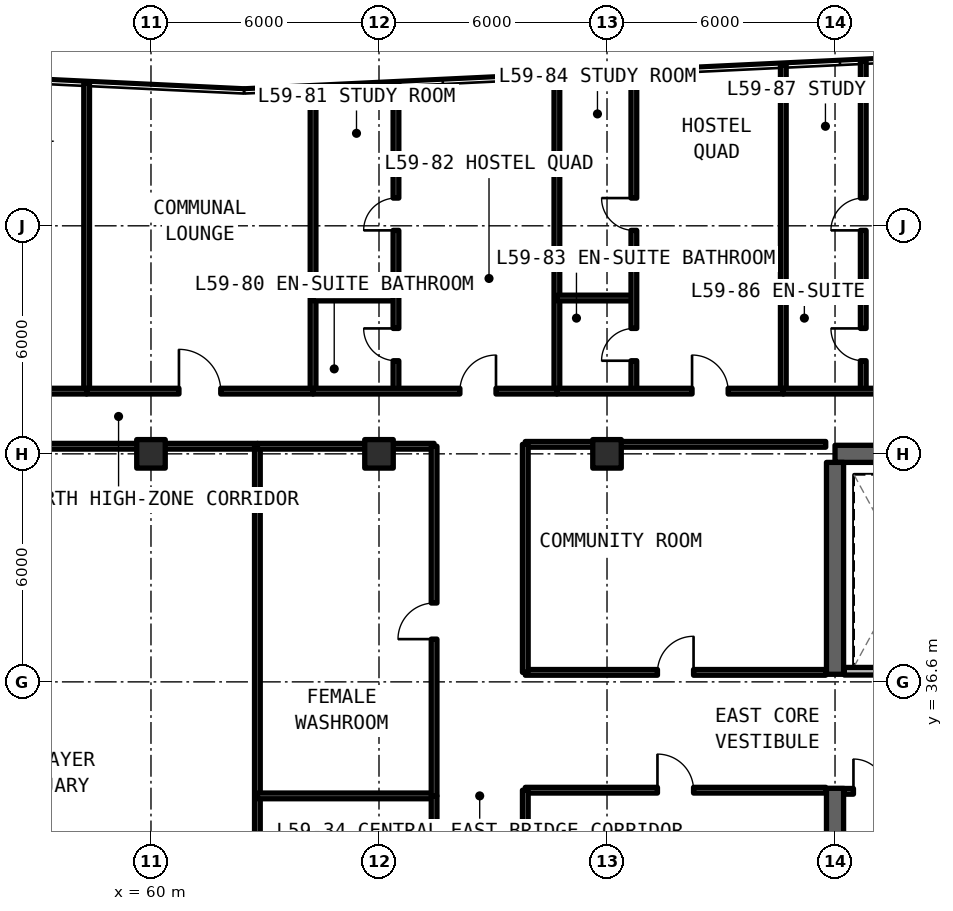
"""IFC4 building model, lengths in metres.
Left out: names, types, materials, properties, quantities, classifications, styles, units other than length and angle.
Written with IfcOpenShell. Run it as: python <this file> out.ifc"""

import sys

from ifc_helpers import new_model, si_unit, direction, frame, frame_2d, origin, origin_2d, place, context, subcontext, project, spatial, rectangle, extrude, element, fill, save


model = new_model("IFC4")
c1 = context("Model", 3, precision=1e-05, world=origin(), true_north=direction((0.0, 1.0)))
c2 = subcontext(c1, "Body", "Model", "MODEL_VIEW")
j1 = project(units=[si_unit("LENGTHUNIT", "METRE"), si_unit("PLANEANGLEUNIT", "RADIAN")], contexts=[c1])
p1 = place(None, origin())
s1 = spatial("IfcSite", under=j1, at=p1, CompositionType="ELEMENT")
p2 = place(p1, origin())
s2 = spatial("IfcBuilding", under=s1, at=p2, CompositionType="ELEMENT")
p3 = place(p2, frame((0.0, 0.0, 211.86)))
s3 = spatial("IfcBuildingStorey", under=s2, at=p3, CompositionType="ELEMENT", Elevation=211.86)
p4 = place(p3, frame((90.0, 42.6, 0.0), z_axis=(0.0, 0.0, 1.0), x_axis=(-1.0, 0.0, 0.0)))
e1 = element("IfcWall", 1, at=p4, inside=s3, PredefinedType="SHEAR", context=c2, shape_type="SweptSolid", body=[
    extrude(rectangle(XDim=12.0, YDim=0.45, at=frame_2d((6.0, 0.0))), origin(), (0.0, 0.0, 1.0), 3.63),
])
p5 = place(p3, frame((78.0, 24.825, 0.0), z_axis=(0.0, 0.0, 1.0), x_axis=(0.0, 1.0, 0.0)))
e2 = element("IfcWall", 2, at=p5, inside=s3, PredefinedType="SHEAR", context=c2, shape_type="SweptSolid", body=[
    extrude(rectangle(XDim=8.975, YDim=0.45, at=frame_2d((4.488, 0.0))), origin(), (0.0, 0.0, 1.0), 3.63),
])
p6 = place(p3, frame((78.0, 36.8, 0.0), z_axis=(0.0, 0.0, 1.0), x_axis=(0.0, 1.0, 0.0)))
e3 = element("IfcWall", 3, at=p6, inside=s3, PredefinedType="SHEAR", context=c2, shape_type="SweptSolid", body=[
    extrude(rectangle(XDim=5.575, YDim=0.45, at=frame_2d((2.788, 0.0))), origin(), (0.0, 0.0, 1.0), 3.63),
])
for number, where, z_axis, x_axis in (
    (4, (60.0, 42.6, 0.0), (0.0, 0.0, 1.0), (1.0, 0.0, 0.0)),
    (5, (66.0, 42.6, 0.0), (0.0, 0.0, 1.0), (1.0, 0.0, 0.0)),
    (6, (72.0, 42.6, 0.0), (0.0, 0.0, 1.0), (1.0, 0.0, 0.0)),
):
    element("IfcColumn", number, at=place(p3, frame(where, z_axis=z_axis, x_axis=x_axis)), inside=s3, PredefinedType="COLUMN", context=c2, shape_type="SweptSolid", body=[
        extrude(rectangle(XDim=0.75, YDim=0.75, at=origin_2d()), origin(), (0.0, 0.0, 1.0), 3.63),
    ])
p7 = place(p3, frame((78.245, 33.72, 0.0), z_axis=(0.0, 0.0, 1.0), x_axis=(1.0, 0.0, 0.0)))
e7 = element("IfcWall", 7, at=p7, inside=s3, PredefinedType="SOLIDWALL", context=c2, shape_type="SweptSolid", body=[
    extrude(rectangle(XDim=1.395, YDim=0.15, at=frame_2d((0.697, 0.0))), origin(), (0.0, 0.0, 1.0), 2.63),
])
p8 = place(p7, frame((0.24, 0.0, 0.0)))
e8 = element("IfcOpeningElement", 8, at=p8, cuts=e7, PredefinedType="OPENING", context=c2, shape_type="SweptSolid", body=[
    extrude(rectangle(XDim=0.85, YDim=2.1, at=frame_2d((0.425, 1.05))), frame((0.0, 0.085, 0.0), z_axis=(0.0, -1.0, 0.0), x_axis=(1.0, 0.0, 0.0)), (0.0, 0.0, 1.0), 0.17),
])
p9 = place(p3, frame((78.245, 36.88, 0.0), z_axis=(0.0, 0.0, 1.0), x_axis=(1.0, 0.0, 0.0)))
e9 = element("IfcWall", 9, at=p9, inside=s3, PredefinedType="SOLIDWALL", context=c2, shape_type="SweptSolid", body=[
    extrude(rectangle(XDim=3.075, YDim=0.2, at=frame_2d((1.538, 0.0))), origin(), (0.0, 0.0, 1.0), 2.63),
])
p10 = place(p3, frame((69.85, 33.75, 0.0), z_axis=(0.0, 0.0, 1.0), x_axis=(1.0, 0.0, 0.0)))
e10 = element("IfcWall", 10, at=p10, inside=s3, PredefinedType="SOLIDWALL", context=c2, shape_type="SweptSolid", body=[
    extrude(rectangle(XDim=7.905, YDim=0.15, at=frame_2d((3.952, 0.0))), origin(), (0.0, 0.0, 1.0), 2.63),
])
p11 = place(p10, frame((3.478, 0.0, 0.0)))
e11 = element("IfcOpeningElement", 11, at=p11, cuts=e10, PredefinedType="OPENING", context=c2, shape_type="SweptSolid", body=[
    extrude(rectangle(XDim=0.95, YDim=2.15, at=frame_2d((0.475, 1.075))), frame((0.0, 0.085, 0.0), z_axis=(0.0, -1.0, 0.0), x_axis=(1.0, 0.0, 0.0)), (0.0, 0.0, 1.0), 0.17),
])
p12 = place(p3, frame((69.85, 24.35, 0.0), z_axis=(0.0, 0.0, 1.0), x_axis=(0.0, 1.0, 0.0)))
e12 = element("IfcWall", 12, at=p12, inside=s3, PredefinedType="SOLIDWALL", context=c2, shape_type="SweptSolid", body=[
    extrude(rectangle(XDim=9.4, YDim=0.15, at=frame_2d((4.7, 0.0))), origin(), (0.0, 0.0, 1.0), 2.63),
])
p13 = place(p3, frame((69.85, 36.85, 0.0), z_axis=(0.0, 0.0, 1.0), x_axis=(1.0, 0.0, 0.0)))
e13 = element("IfcWall", 13, at=p13, inside=s3, PredefinedType="SOLIDWALL", context=c2, shape_type="SweptSolid", body=[
    extrude(rectangle(XDim=7.905, YDim=0.15, at=frame_2d((3.952, 0.0))), origin(), (0.0, 0.0, 1.0), 2.63),
])
p14 = place(p13, frame((3.478, 0.0, 0.0)))
e14 = element("IfcOpeningElement", 14, at=p14, cuts=e13, PredefinedType="OPENING", context=c2, shape_type="SweptSolid", body=[
    extrude(rectangle(XDim=0.95, YDim=2.15, at=frame_2d((0.475, 1.075))), frame((0.0, 0.085, 0.0), z_axis=(0.0, -1.0, 0.0), x_axis=(1.0, 0.0, 0.0)), (0.0, 0.0, 1.0), 0.17),
])
p15 = place(p3, frame((69.85, 42.85, 0.0), z_axis=(0.0, 0.0, 1.0), x_axis=(1.0, 0.0, 0.0)))
e15 = element("IfcWall", 15, at=p15, inside=s3, PredefinedType="SOLIDWALL", context=c2, shape_type="SweptSolid", body=[
    extrude(rectangle(XDim=7.905, YDim=0.15, at=frame_2d((3.952, 0.0))), origin(), (0.0, 0.0, 1.0), 2.63),
])
p16 = place(p3, frame((69.85, 36.85, 0.0), z_axis=(0.0, 0.0, 1.0), x_axis=(0.0, 1.0, 0.0)))
e16 = element("IfcWall", 16, at=p16, inside=s3, PredefinedType="SOLIDWALL", context=c2, shape_type="SweptSolid", body=[
    extrude(rectangle(XDim=6.0, YDim=0.15, at=frame_2d((3.0, 0.0))), origin(), (0.0, 0.0, 1.0), 2.63),
])
p17 = place(p3, frame((51.2, 42.8, 0.0), z_axis=(0.0, 0.0, 1.0), x_axis=(1.0, 0.0, 0.0)))
e17 = element("IfcWall", 17, at=p17, inside=s3, PredefinedType="SOLIDWALL", context=c2, shape_type="SweptSolid", body=[
    extrude(rectangle(XDim=11.6, YDim=0.15, at=frame_2d((5.8, 0.0))), origin(), (0.0, 0.0, 1.0), 2.63),
])
p18 = place(p3, frame((62.8, 24.4, 0.0), z_axis=(0.0, 0.0, 1.0), x_axis=(0.0, 1.0, 0.0)))
e18 = element("IfcWall", 18, at=p18, inside=s3, PredefinedType="SOLIDWALL", context=c2, shape_type="SweptSolid", body=[
    extrude(rectangle(XDim=18.4, YDim=0.15, at=frame_2d((9.2, 0.0))), origin(), (0.0, 0.0, 1.0), 2.63),
])
p19 = place(p3, frame((62.8, 33.6, 0.0), z_axis=(0.0, 0.0, 1.0), x_axis=(1.0, 0.0, 0.0)))
e19 = element("IfcWall", 19, at=p19, inside=s3, PredefinedType="SOLIDWALL", context=c2, shape_type="SweptSolid", body=[
    extrude(rectangle(XDim=4.65, YDim=0.15, at=frame_2d((2.325, 0.0))), origin(), (0.0, 0.0, 1.0), 2.63),
])
p20 = place(p3, frame((67.45, 24.4, 0.0), z_axis=(0.0, 0.0, 1.0), x_axis=(0.0, 1.0, 0.0)))
e20 = element("IfcWall", 20, at=p20, inside=s3, PredefinedType="SOLIDWALL", context=c2, shape_type="SweptSolid", body=[
    extrude(rectangle(XDim=9.2, YDim=0.15, at=frame_2d((4.6, 0.0))), origin(), (0.0, 0.0, 1.0), 2.63),
])
p21 = place(p20, frame((4.125, 0.0, 0.0)))
e21 = element("IfcOpeningElement", 21, at=p21, cuts=e20, PredefinedType="OPENING", context=c2, shape_type="SweptSolid", body=[
    extrude(rectangle(XDim=0.95, YDim=2.15, at=frame_2d((0.475, 1.075))), frame((0.0, 0.085, 0.0), z_axis=(0.0, -1.0, 0.0), x_axis=(1.0, 0.0, 0.0)), (0.0, 0.0, 1.0), 0.17),
])
p22 = place(p3, frame((62.8, 42.8, 0.0), z_axis=(0.0, 0.0, 1.0), x_axis=(1.0, 0.0, 0.0)))
e22 = element("IfcWall", 22, at=p22, inside=s3, PredefinedType="SOLIDWALL", context=c2, shape_type="SweptSolid", body=[
    extrude(rectangle(XDim=4.65, YDim=0.15, at=frame_2d((2.325, 0.0))), origin(), (0.0, 0.0, 1.0), 2.63),
])
p23 = place(p3, frame((67.45, 33.6, 0.0), z_axis=(0.0, 0.0, 1.0), x_axis=(0.0, 1.0, 0.0)))
e23 = element("IfcWall", 23, at=p23, inside=s3, PredefinedType="SOLIDWALL", context=c2, shape_type="SweptSolid", body=[
    extrude(rectangle(XDim=9.2, YDim=0.15, at=frame_2d((4.6, 0.0))), origin(), (0.0, 0.0, 1.0), 2.63),
])
p24 = place(p23, frame((4.125, 0.0, 0.0)))
e24 = element("IfcOpeningElement", 24, at=p24, cuts=e23, PredefinedType="OPENING", context=c2, shape_type="SweptSolid", body=[
    extrude(rectangle(XDim=0.95, YDim=2.15, at=frame_2d((0.475, 1.075))), frame((0.0, 0.085, 0.0), z_axis=(0.0, -1.0, 0.0), x_axis=(1.0, 0.0, 0.0)), (0.0, 0.0, 1.0), 0.17),
])
p25 = place(p3, frame((58.307, 44.25, 0.0), z_axis=(0.0, 0.0, 1.0), x_axis=(0.0, 1.0, 0.0)))
e25 = element("IfcWall", 25, at=p25, inside=s3, PredefinedType="SOLIDWALL", context=c2, shape_type="SweptSolid", body=[
    extrude(rectangle(XDim=8.108, YDim=0.15, at=frame_2d((4.054, 0.0))), origin(), (0.0, 0.0, 1.0), 2.63),
])
p26 = place(p3, frame((52.12, 44.25, 0.0), z_axis=(0.0, 0.0, 1.0), x_axis=(1.0, 0.0, 0.0)))
e26 = element("IfcWall", 26, at=p26, inside=s3, PredefinedType="SOLIDWALL", context=c2, shape_type="SweptSolid", body=[
    extrude(rectangle(XDim=6.187, YDim=0.15, at=frame_2d((3.093, 0.0))), origin(), (0.0, 0.0, 1.0), 2.63),
])
p27 = place(p26, frame((3.71, 0.0, 0.0)))
e27 = element("IfcOpeningElement", 27, at=p27, cuts=e26, PredefinedType="OPENING", context=c2, shape_type="SweptSolid", body=[
    extrude(rectangle(XDim=0.95, YDim=2.15, at=frame_2d((0.475, 1.075))), frame((0.0, 0.085, 0.0), z_axis=(0.0, -1.0, 0.0), x_axis=(1.0, 0.0, 0.0)), (0.0, 0.0, 1.0), 0.17),
])
p28 = place(p3, frame((64.265, 44.25, 0.0), z_axis=(0.0, 0.0, 1.0), x_axis=(0.0, 1.0, 0.0)))
e28 = element("IfcWall", 28, at=p28, inside=s3, PredefinedType="SOLIDWALL", context=c2, shape_type="SweptSolid", body=[
    extrude(rectangle(XDim=7.997, YDim=0.15, at=frame_2d((3.998, 0.0))), origin(), (0.0, 0.0, 1.0), 2.63),
])
p29 = place(p3, frame((58.307, 44.25, 0.0), z_axis=(0.0, 0.0, 1.0), x_axis=(1.0, 0.0, 0.0)))
e29 = element("IfcWall", 29, at=p29, inside=s3, PredefinedType="SOLIDWALL", context=c2, shape_type="SweptSolid", body=[
    extrude(rectangle(XDim=5.958, YDim=0.15, at=frame_2d((2.979, 0.0))), origin(), (0.0, 0.0, 1.0), 2.63),
])
p30 = place(p29, frame((2.429, 0.0, 0.0)))
e30 = element("IfcOpeningElement", 30, at=p30, cuts=e29, PredefinedType="OPENING", context=c2, shape_type="SweptSolid", body=[
    extrude(rectangle(XDim=1.1, YDim=2.15, at=frame_2d((0.55, 1.075))), frame((0.0, 0.085, 0.0), z_axis=(0.0, -1.0, 0.0), x_axis=(1.0, 0.0, 0.0)), (0.0, 0.0, 1.0), 0.17),
])
p31 = place(p3, frame((70.681, 44.25, 0.0), z_axis=(0.0, 0.0, 1.0), x_axis=(0.0, 1.0, 0.0)))
e31 = element("IfcWall", 31, at=p31, inside=s3, PredefinedType="SOLIDWALL", context=c2, shape_type="SweptSolid", body=[
    extrude(rectangle(XDim=8.304, YDim=0.15, at=frame_2d((4.152, 0.0))), origin(), (0.0, 0.0, 1.0), 2.63),
])
p32 = place(p3, frame((64.265, 46.7, 0.0), z_axis=(0.0, 0.0, 1.0), x_axis=(1.0, 0.0, 0.0)))
e32 = element("IfcWall", 32, at=p32, inside=s3, PredefinedType="PARTITIONING", context=c2, shape_type="SweptSolid", body=[
    extrude(rectangle(XDim=2.181, YDim=0.15, at=frame_2d((1.091, 0.0))), origin(), (0.0, 0.0, 1.0), 2.63),
])
p33 = place(p3, frame((66.446, 44.25, 0.0), z_axis=(0.0, 0.0, 1.0), x_axis=(0.0, 1.0, 0.0)))
e33 = element("IfcWall", 33, at=p33, inside=s3, PredefinedType="PARTITIONING", context=c2, shape_type="SweptSolid", body=[
    extrude(rectangle(XDim=8.101, YDim=0.15, at=frame_2d((4.051, 0.0))), origin(), (0.0, 0.0, 1.0), 2.63),
])
p34 = place(p33, frame((0.8, 0.0, 0.0)))
e34 = element("IfcOpeningElement", 34, at=p34, cuts=e33, PredefinedType="OPENING", context=c2, shape_type="SweptSolid", body=[
    extrude(rectangle(XDim=0.85, YDim=2.1, at=frame_2d((0.425, 1.05))), frame((0.0, 0.085, 0.0), z_axis=(0.0, -1.0, 0.0), x_axis=(1.0, 0.0, 0.0)), (0.0, 0.0, 1.0), 0.17),
])
p35 = place(p33, frame((4.23, 0.0, 0.0)))
e35 = element("IfcOpeningElement", 35, at=p35, cuts=e33, PredefinedType="OPENING", context=c2, shape_type="SweptSolid", body=[
    extrude(rectangle(XDim=0.85, YDim=2.1, at=frame_2d((0.425, 1.05))), frame((0.0, 0.085, 0.0), z_axis=(0.0, -1.0, 0.0), x_axis=(1.0, 0.0, 0.0)), (0.0, 0.0, 1.0), 0.17),
])
p36 = place(p3, frame((64.265, 44.25, 0.0), z_axis=(0.0, 0.0, 1.0), x_axis=(1.0, 0.0, 0.0)))
e36 = element("IfcWall", 36, at=p36, inside=s3, PredefinedType="SOLIDWALL", context=c2, shape_type="SweptSolid", body=[
    extrude(rectangle(XDim=6.416, YDim=0.15, at=frame_2d((3.208, 0.0))), origin(), (0.0, 0.0, 1.0), 2.63),
])
p37 = place(p36, frame((3.864, 0.0, 0.0)))
e37 = element("IfcOpeningElement", 37, at=p37, cuts=e36, PredefinedType="OPENING", context=c2, shape_type="SweptSolid", body=[
    extrude(rectangle(XDim=0.95, YDim=2.15, at=frame_2d((0.475, 1.075))), frame((0.0, 0.085, 0.0), z_axis=(0.0, -1.0, 0.0), x_axis=(1.0, 0.0, 0.0)), (0.0, 0.0, 1.0), 0.17),
])
p38 = place(p3, frame((76.639, 44.25, 0.0), z_axis=(0.0, 0.0, 1.0), x_axis=(0.0, 1.0, 0.0)))
e38 = element("IfcWall", 38, at=p38, inside=s3, PredefinedType="SOLIDWALL", context=c2, shape_type="SweptSolid", body=[
    extrude(rectangle(XDim=8.589, YDim=0.15, at=frame_2d((4.294, 0.0))), origin(), (0.0, 0.0, 1.0), 2.63),
])
p39 = place(p3, frame((70.681, 46.7, 0.0), z_axis=(0.0, 0.0, 1.0), x_axis=(1.0, 0.0, 0.0)))
e39 = element("IfcWall", 39, at=p39, inside=s3, PredefinedType="PARTITIONING", context=c2, shape_type="SweptSolid", body=[
    extrude(rectangle(XDim=2.026, YDim=0.15, at=frame_2d((1.013, 0.0))), origin(), (0.0, 0.0, 1.0), 2.63),
])
p40 = place(p3, frame((72.707, 44.25, 0.0), z_axis=(0.0, 0.0, 1.0), x_axis=(0.0, 1.0, 0.0)))
e40 = element("IfcWall", 40, at=p40, inside=s3, PredefinedType="PARTITIONING", context=c2, shape_type="SweptSolid", body=[
    extrude(rectangle(XDim=8.401, YDim=0.15, at=frame_2d((4.2, 0.0))), origin(), (0.0, 0.0, 1.0), 2.63),
])
p41 = place(p40, frame((0.8, 0.0, 0.0)))
e41 = element("IfcOpeningElement", 41, at=p41, cuts=e40, PredefinedType="OPENING", context=c2, shape_type="SweptSolid", body=[
    extrude(rectangle(XDim=0.85, YDim=2.1, at=frame_2d((0.425, 1.05))), frame((0.0, 0.085, 0.0), z_axis=(0.0, -1.0, 0.0), x_axis=(1.0, 0.0, 0.0)), (0.0, 0.0, 1.0), 0.17),
])
p42 = place(p40, frame((4.23, 0.0, 0.0)))
e42 = element("IfcOpeningElement", 42, at=p42, cuts=e40, PredefinedType="OPENING", context=c2, shape_type="SweptSolid", body=[
    extrude(rectangle(XDim=0.85, YDim=2.1, at=frame_2d((0.425, 1.05))), frame((0.0, 0.085, 0.0), z_axis=(0.0, -1.0, 0.0), x_axis=(1.0, 0.0, 0.0)), (0.0, 0.0, 1.0), 0.17),
])
p43 = place(p3, frame((70.681, 44.25, 0.0), z_axis=(0.0, 0.0, 1.0), x_axis=(1.0, 0.0, 0.0)))
e43 = element("IfcWall", 43, at=p43, inside=s3, PredefinedType="SOLIDWALL", context=c2, shape_type="SweptSolid", body=[
    extrude(rectangle(XDim=5.958, YDim=0.15, at=frame_2d((2.979, 0.0))), origin(), (0.0, 0.0, 1.0), 2.63),
])
p44 = place(p43, frame((3.557, 0.0, 0.0)))
e44 = element("IfcOpeningElement", 44, at=p44, cuts=e43, PredefinedType="OPENING", context=c2, shape_type="SweptSolid", body=[
    extrude(rectangle(XDim=0.95, YDim=2.15, at=frame_2d((0.475, 1.075))), frame((0.0, 0.085, 0.0), z_axis=(0.0, -1.0, 0.0), x_axis=(1.0, 0.0, 0.0)), (0.0, 0.0, 1.0), 0.17),
])
p45 = place(p3, frame((76.639, 46.7, 0.0), z_axis=(0.0, 0.0, 1.0), x_axis=(1.0, 0.0, 0.0)))
e45 = element("IfcWall", 45, at=p45, inside=s3, PredefinedType="PARTITIONING", context=c2, shape_type="SweptSolid", body=[
    extrude(rectangle(XDim=2.104, YDim=0.15, at=frame_2d((1.052, 0.0))), origin(), (0.0, 0.0, 1.0), 2.63),
])
p46 = place(p3, frame((78.743, 44.25, 0.0), z_axis=(0.0, 0.0, 1.0), x_axis=(0.0, 1.0, 0.0)))
e46 = element("IfcWall", 46, at=p46, inside=s3, PredefinedType="PARTITIONING", context=c2, shape_type="SweptSolid", body=[
    extrude(rectangle(XDim=8.689, YDim=0.15, at=frame_2d((4.345, 0.0))), origin(), (0.0, 0.0, 1.0), 2.63),
])
p47 = place(p46, frame((0.8, 0.0, 0.0)))
e47 = element("IfcOpeningElement", 47, at=p47, cuts=e46, PredefinedType="OPENING", context=c2, shape_type="SweptSolid", body=[
    extrude(rectangle(XDim=0.85, YDim=2.1, at=frame_2d((0.425, 1.05))), frame((0.0, 0.085, 0.0), z_axis=(0.0, -1.0, 0.0), x_axis=(1.0, 0.0, 0.0)), (0.0, 0.0, 1.0), 0.17),
])
p48 = place(p46, frame((4.23, 0.0, 0.0)))
e48 = element("IfcOpeningElement", 48, at=p48, cuts=e46, PredefinedType="OPENING", context=c2, shape_type="SweptSolid", body=[
    extrude(rectangle(XDim=0.85, YDim=2.1, at=frame_2d((0.425, 1.05))), frame((0.0, 0.085, 0.0), z_axis=(0.0, -1.0, 0.0), x_axis=(1.0, 0.0, 0.0)), (0.0, 0.0, 1.0), 0.17),
])
p49 = place(p3, frame((76.639, 44.25, 0.0), z_axis=(0.0, 0.0, 1.0), x_axis=(1.0, 0.0, 0.0)))
e49 = element("IfcWall", 49, at=p49, inside=s3, PredefinedType="SOLIDWALL", context=c2, shape_type="SweptSolid", body=[
    extrude(rectangle(XDim=6.187, YDim=0.15, at=frame_2d((3.094, 0.0))), origin(), (0.0, 0.0, 1.0), 2.63),
])
p50 = place(p49, frame((3.71, 0.0, 0.0)))
e50 = element("IfcOpeningElement", 50, at=p50, cuts=e49, PredefinedType="OPENING", context=c2, shape_type="SweptSolid", body=[
    extrude(rectangle(XDim=0.95, YDim=2.15, at=frame_2d((0.475, 1.075))), frame((0.0, 0.085, 0.0), z_axis=(0.0, -1.0, 0.0), x_axis=(1.0, 0.0, 0.0)), (0.0, 0.0, 1.0), 0.17),
])
p51 = place(p8, origin())
e51 = element("IfcDoor", 51, at=p51, inside=s3, OperationType="SINGLE_SWING_LEFT", PredefinedType="DOOR", context=c2, shape_type="SweptSolid", body=[
    extrude(rectangle(XDim=0.85, YDim=2.1, at=frame_2d((0.425, 1.05))), frame((0.0, 0.025, 0.0), z_axis=(0.0, -1.0, 0.0), x_axis=(1.0, 0.0, 0.0)), (0.0, 0.0, 1.0), 0.05),
])
fill(e8, e51)
p52 = place(p11, origin())
e52 = element("IfcDoor", 52, at=p52, inside=s3, OperationType="SINGLE_SWING_LEFT", PredefinedType="DOOR", context=c2, shape_type="SweptSolid", body=[
    extrude(rectangle(XDim=0.95, YDim=2.15, at=frame_2d((0.475, 1.075))), frame((0.0, 0.025, 0.0), z_axis=(0.0, -1.0, 0.0), x_axis=(1.0, 0.0, 0.0)), (0.0, 0.0, 1.0), 0.05),
])
fill(e11, e52)
p53 = place(p14, origin())
e53 = element("IfcDoor", 53, at=p53, inside=s3, OperationType="SINGLE_SWING_RIGHT", PredefinedType="DOOR", context=c2, shape_type="SweptSolid", body=[
    extrude(rectangle(XDim=0.95, YDim=2.15, at=frame_2d((0.475, 1.075))), frame((0.0, 0.025, 0.0), z_axis=(0.0, -1.0, 0.0), x_axis=(1.0, 0.0, 0.0)), (0.0, 0.0, 1.0), 0.05),
])
fill(e14, e53)
p54 = place(p24, origin())
e54 = element("IfcDoor", 54, at=p54, inside=s3, OperationType="SINGLE_SWING_LEFT", PredefinedType="DOOR", context=c2, shape_type="SweptSolid", body=[
    extrude(rectangle(XDim=0.95, YDim=2.15, at=frame_2d((0.475, 1.075))), frame((0.0, 0.025, 0.0), z_axis=(0.0, -1.0, 0.0), x_axis=(1.0, 0.0, 0.0)), (0.0, 0.0, 1.0), 0.05),
])
fill(e24, e54)
p55 = place(p30, origin())
e55 = element("IfcDoor", 55, at=p55, inside=s3, OperationType="SINGLE_SWING_LEFT", PredefinedType="DOOR", context=c2, shape_type="SweptSolid", body=[
    extrude(rectangle(XDim=1.1, YDim=2.15, at=frame_2d((0.55, 1.075))), frame((0.0, 0.025, 0.0), z_axis=(0.0, -1.0, 0.0), x_axis=(1.0, 0.0, 0.0)), (0.0, 0.0, 1.0), 0.05),
])
fill(e30, e55)
p56 = place(p34, origin())
e56 = element("IfcDoor", 56, at=p56, inside=s3, OperationType="SINGLE_SWING_RIGHT", PredefinedType="DOOR", context=c2, shape_type="SweptSolid", body=[
    extrude(rectangle(XDim=0.85, YDim=2.1, at=frame_2d((0.425, 1.05))), frame((0.0, 0.025, 0.0), z_axis=(0.0, -1.0, 0.0), x_axis=(1.0, 0.0, 0.0)), (0.0, 0.0, 1.0), 0.05),
])
fill(e34, e56)
p57 = place(p35, origin())
e57 = element("IfcDoor", 57, at=p57, inside=s3, OperationType="SINGLE_SWING_LEFT", PredefinedType="DOOR", context=c2, shape_type="SweptSolid", body=[
    extrude(rectangle(XDim=0.85, YDim=2.1, at=frame_2d((0.425, 1.05))), frame((0.0, 0.025, 0.0), z_axis=(0.0, -1.0, 0.0), x_axis=(1.0, 0.0, 0.0)), (0.0, 0.0, 1.0), 0.05),
])
fill(e35, e57)
p58 = place(p37, origin())
e58 = element("IfcDoor", 58, at=p58, inside=s3, OperationType="SINGLE_SWING_RIGHT", PredefinedType="DOOR", context=c2, shape_type="SweptSolid", body=[
    extrude(rectangle(XDim=0.95, YDim=2.15, at=frame_2d((0.475, 1.075))), frame((0.0, 0.025, 0.0), z_axis=(0.0, -1.0, 0.0), x_axis=(1.0, 0.0, 0.0)), (0.0, 0.0, 1.0), 0.05),
])
fill(e37, e58)
p59 = place(p41, origin())
e59 = element("IfcDoor", 59, at=p59, inside=s3, OperationType="SINGLE_SWING_LEFT", PredefinedType="DOOR", context=c2, shape_type="SweptSolid", body=[
    extrude(rectangle(XDim=0.85, YDim=2.1, at=frame_2d((0.425, 1.05))), frame((0.0, 0.025, 0.0), z_axis=(0.0, -1.0, 0.0), x_axis=(1.0, 0.0, 0.0)), (0.0, 0.0, 1.0), 0.05),
])
fill(e41, e59)
p60 = place(p42, origin())
e60 = element("IfcDoor", 60, at=p60, inside=s3, OperationType="SINGLE_SWING_RIGHT", PredefinedType="DOOR", context=c2, shape_type="SweptSolid", body=[
    extrude(rectangle(XDim=0.85, YDim=2.1, at=frame_2d((0.425, 1.05))), frame((0.0, 0.025, 0.0), z_axis=(0.0, -1.0, 0.0), x_axis=(1.0, 0.0, 0.0)), (0.0, 0.0, 1.0), 0.05),
])
fill(e42, e60)
p61 = place(p44, origin())
e61 = element("IfcDoor", 61, at=p61, inside=s3, OperationType="SINGLE_SWING_LEFT", PredefinedType="DOOR", context=c2, shape_type="SweptSolid", body=[
    extrude(rectangle(XDim=0.95, YDim=2.15, at=frame_2d((0.475, 1.075))), frame((0.0, 0.025, 0.0), z_axis=(0.0, -1.0, 0.0), x_axis=(1.0, 0.0, 0.0)), (0.0, 0.0, 1.0), 0.05),
])
fill(e44, e61)
p62 = place(p47, origin())
e62 = element("IfcDoor", 62, at=p62, inside=s3, OperationType="SINGLE_SWING_RIGHT", PredefinedType="DOOR", context=c2, shape_type="SweptSolid", body=[
    extrude(rectangle(XDim=0.85, YDim=2.1, at=frame_2d((0.425, 1.05))), frame((0.0, 0.025, 0.0), z_axis=(0.0, -1.0, 0.0), x_axis=(1.0, 0.0, 0.0)), (0.0, 0.0, 1.0), 0.05),
])
fill(e47, e62)
p63 = place(p48, origin())
e63 = element("IfcDoor", 63, at=p63, inside=s3, OperationType="SINGLE_SWING_LEFT", PredefinedType="DOOR", context=c2, shape_type="SweptSolid", body=[
    extrude(rectangle(XDim=0.85, YDim=2.1, at=frame_2d((0.425, 1.05))), frame((0.0, 0.025, 0.0), z_axis=(0.0, -1.0, 0.0), x_axis=(1.0, 0.0, 0.0)), (0.0, 0.0, 1.0), 0.05),
])
fill(e48, e63)
save(model, sys.argv[1])
